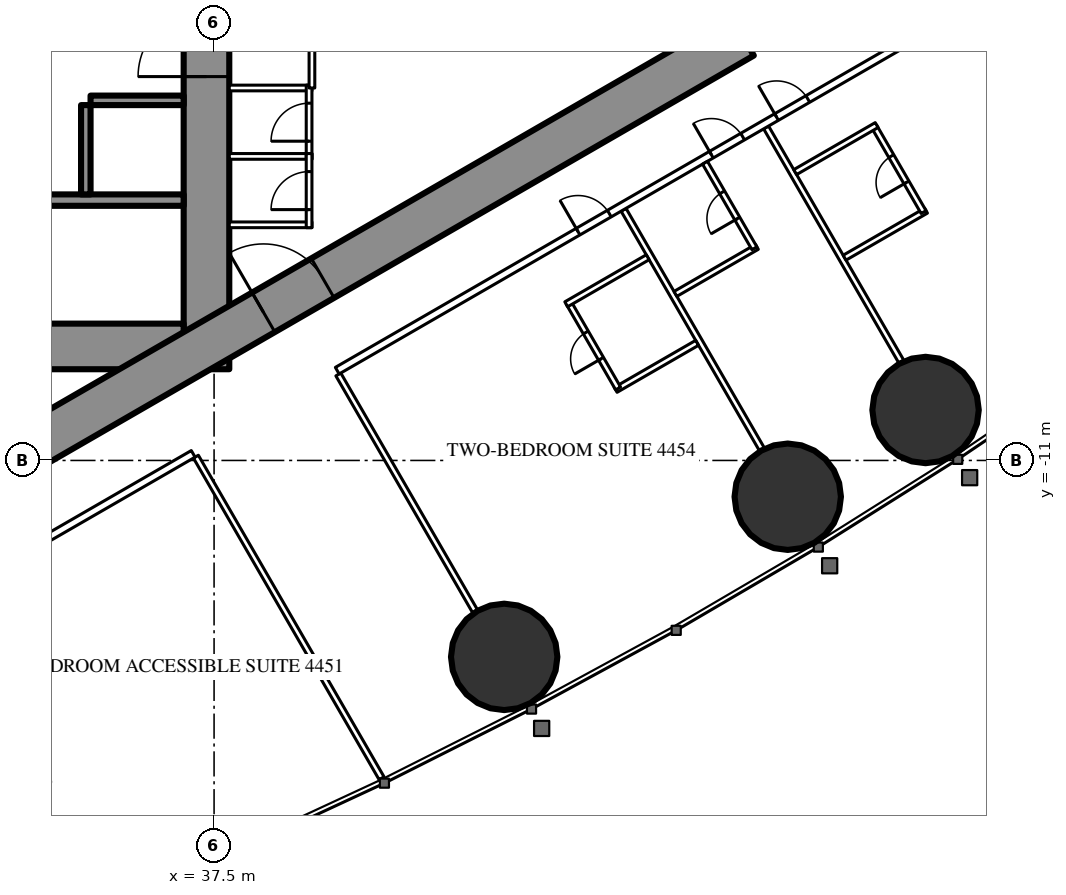
"""IFC4 building model, lengths in metres.
Left out: names, types, materials, properties, quantities, classifications, styles, units other than length and angle.
Written with IfcOpenShell. Run it as: python <this file> out.ifc"""

import sys

from ifc_helpers import new_model, si_unit, direction, frame, frame_2d, origin, origin_2d, place, context, subcontext, project, spatial, rectangle, circle, extrude, element, fill, save


model = new_model("IFC4")
c1 = context("Model", 3, precision=1e-05, world=origin(), true_north=direction((0.0, 1.0)))
c2 = subcontext(c1, "Body", "Model", "MODEL_VIEW")
j1 = project(units=[si_unit("LENGTHUNIT", "METRE"), si_unit("PLANEANGLEUNIT", "RADIAN")], contexts=[c1])
p1 = place(None, origin())
s1 = spatial("IfcSite", under=j1, at=p1, CompositionType="ELEMENT")
p2 = place(p1, origin())
s2 = spatial("IfcBuilding", under=s1, at=p2, CompositionType="ELEMENT")
p3 = place(p2, frame((0.0, 0.0, 166.8)))
s3 = spatial("IfcBuildingStorey", under=s2, at=p3, CompositionType="ELEMENT", Elevation=166.8)
for number, where, z_axis, x_axis in (
    (1, (45.134, -16.168, 0.0), (0.0, 0.0, 1.0), (1.0, 0.0, 0.0)),
    (2, (52.594, -11.955, 0.0), (0.0, 0.0, 1.0), (1.0, 0.0, 0.0)),
    (3, (56.221, -9.672, 0.0), (0.0, 0.0, 1.0), (1.0, 0.0, 0.0)),
):
    element("IfcColumn", number, at=place(p3, frame(where, z_axis=z_axis, x_axis=x_axis)), inside=s3, PredefinedType="COLUMN", context=c2, shape_type="SweptSolid", body=[
        extrude(circle(Radius=1.4, at=origin_2d()), origin(), (0.0, 0.0, 1.0), 3.5),
    ])
p4 = place(p3, frame((37.3, -8.6, 0.0), z_axis=(0.0, 0.0, 1.0), x_axis=(0.0, 1.0, 0.0)))
e4 = element("IfcWall", 4, at=p4, inside=s3, PredefinedType="SHEAR", context=c2, shape_type="SweptSolid", body=[
    extrude(rectangle(XDim=17.2, YDim=1.2, at=frame_2d((8.6, 0.0))), origin(), (0.0, 0.0, 1.0), 3.5),
])
p5 = place(p4, frame((7.7, 0.0, 0.0)))
e5 = element("IfcOpeningElement", 5, at=p5, cuts=e4, PredefinedType="OPENING", context=c2, shape_type="SweptSolid", body=[
    extrude(rectangle(XDim=1.8, YDim=2.2, at=frame_2d((0.9, 1.1))), frame((0.0, 0.61, 0.0), z_axis=(0.0, -1.0, 0.0), x_axis=(1.0, 0.0, 0.0)), (0.0, 0.0, 1.0), 1.22),
])
p6 = place(p3, frame((28.3, -8.0, 0.0), z_axis=(0.0, 0.0, 1.0), x_axis=(1.0, 0.0, 0.0)))
e6 = element("IfcWall", 6, at=p6, inside=s3, PredefinedType="SHEAR", context=c2, shape_type="SweptSolid", body=[
    extrude(rectangle(XDim=8.4, YDim=1.2, at=frame_2d((4.2, 0.0))), origin(), (0.0, 0.0, 1.0), 3.5),
])
p7 = place(p6, frame((0.25, 0.0, 0.0)))
e7 = element("IfcOpeningElement", 7, at=p7, cuts=e6, PredefinedType="OPENING", context=c2, shape_type="SweptSolid", body=[
    extrude(rectangle(XDim=1.0, YDim=2.2, at=frame_2d((0.5, 1.1))), frame((0.0, 0.61, 0.0), z_axis=(0.0, -1.0, 0.0), x_axis=(1.0, 0.0, 0.0)), (0.0, 0.0, 1.0), 1.22),
])
p8 = place(p3, frame((28.3, -4.15, 0.0), z_axis=(0.0, 0.0, 1.0), x_axis=(1.0, 0.0, 0.0)))
e8 = element("IfcWall", 8, at=p8, inside=s3, PredefinedType="SHEAR", context=c2, shape_type="SweptSolid", body=[
    extrude(rectangle(XDim=8.4, YDim=0.3, at=frame_2d((4.2, 0.0))), origin(), (0.0, 0.0, 1.0), 3.5),
])
p9 = place(p3, frame((34.125, -4.0, 0.0), z_axis=(0.0, 0.0, 1.0), x_axis=(0.0, 1.0, 0.0)))
e9 = element("IfcWall", 9, at=p9, inside=s3, PredefinedType="SHEAR", context=c2, shape_type="SweptSolid", body=[
    extrude(rectangle(XDim=2.35, YDim=0.25, at=frame_2d((1.175, 0.0))), origin(), (0.0, 0.0, 1.0), 3.5),
])
p10 = place(p3, frame((34.25, -1.525, 0.0), z_axis=(0.0, 0.0, 1.0), x_axis=(1.0, 0.0, 0.0)))
e10 = element("IfcWall", 10, at=p10, inside=s3, PredefinedType="SHEAR", context=c2, shape_type="SweptSolid", body=[
    extrude(rectangle(XDim=2.45, YDim=0.25, at=frame_2d((1.225, 0.0))), origin(), (0.0, 0.0, 1.0), 3.5),
])
p11 = place(p3, frame((27.2, -13.8, 0.0), z_axis=(0.0, 0.0, 1.0), x_axis=(0.866027159892, 0.499996958321, 0.0)))
e11 = element("IfcWall", 11, at=p11, inside=s3, PredefinedType="SHEAR", context=c2, shape_type="SweptSolid", body=[
    extrude(rectangle(XDim=27.947, YDim=1.2, at=frame_2d((13.973, 0.0))), origin(), (0.0, 0.0, 1.0), 3.5),
])
p12 = place(p11, frame((4.6, 0.0, 0.0)))
e12 = element("IfcOpeningElement", 12, at=p12, cuts=e11, PredefinedType="OPENING", context=c2, shape_type="SweptSolid", body=[
    extrude(rectangle(XDim=1.0, YDim=2.2, at=frame_2d((0.5, 1.1))), frame((0.0, 0.61, 0.0), z_axis=(0.0, -1.0, 0.0), x_axis=(1.0, 0.0, 0.0)), (0.0, 0.0, 1.0), 1.22),
])
p13 = place(p11, frame((13.395, 0.0, 0.0)))
e13 = element("IfcOpeningElement", 13, at=p13, cuts=e11, PredefinedType="OPENING", context=c2, shape_type="SweptSolid", body=[
    extrude(rectangle(XDim=1.8, YDim=2.2, at=frame_2d((0.9, 1.1))), frame((0.0, 0.61, 0.0), z_axis=(0.0, -1.0, 0.0), x_axis=(1.0, 0.0, 0.0)), (0.0, 0.0, 1.0), 1.22),
])
p14 = place(p3, frame((37.022, -10.9, 0.0), z_axis=(0.0, 0.0, 1.0), x_axis=(0.499998620953, -0.866026199976, 0.0)))
e14 = element("IfcWall", 14, at=p14, inside=s3, PredefinedType="PARTITIONING", context=c2, shape_type="SweptSolid", body=[
    extrude(rectangle(XDim=9.77, YDim=0.15, at=frame_2d((4.885, 0.0))), origin(), (0.0, 0.0, 1.0), 3.25),
])
p15 = place(p3, frame((40.769, -8.737, 0.0), z_axis=(0.0, 0.0, 1.0), x_axis=(0.500013115284, -0.866017831539, 0.0)))
e15 = element("IfcWall", 15, at=p15, inside=s3, PredefinedType="PARTITIONING", context=c2, shape_type="SweptSolid", body=[
    extrude(rectangle(XDim=7.198, YDim=0.15, at=frame_2d((3.599, 0.0))), origin(), (0.0, 0.0, 1.0), 2.3),
])
p16 = place(p3, frame((48.275, -4.404, 0.0), z_axis=(0.0, 0.0, 1.0), x_axis=(0.500006004368, -0.866021937133, 0.0)))
e16 = element("IfcWall", 16, at=p16, inside=s3, PredefinedType="PARTITIONING", context=c2, shape_type="SweptSolid", body=[
    extrude(rectangle(XDim=7.279, YDim=0.15, at=frame_2d((3.64, 0.0))), origin(), (0.0, 0.0, 1.0), 2.3),
])
p17 = place(p3, frame((52.025, -2.238, 0.0), z_axis=(0.0, 0.0, 1.0), x_axis=(0.499983785035, -0.866034765296, 0.0)))
e17 = element("IfcWall", 17, at=p17, inside=s3, PredefinedType="PARTITIONING", context=c2, shape_type="SweptSolid", body=[
    extrude(rectangle(XDim=7.116, YDim=0.15, at=frame_2d((3.558, 0.0))), origin(), (0.0, 0.0, 1.0), 2.3),
])
p18 = place(p3, frame((27.959, -16.017, 0.0), z_axis=(0.0, 0.0, 1.0), x_axis=(0.866026201739, 0.499998617899, 0.0)))
e18 = element("IfcWall", 18, at=p18, inside=s3, PredefinedType="PARTITIONING", context=c2, shape_type="SweptSolid", body=[
    extrude(rectangle(XDim=10.382, YDim=0.2, at=frame_2d((5.191, 0.0))), origin(), (0.0, 0.0, 1.0), 3.25),
])
p19 = place(p18, frame((3.35, 0.0, 0.0)))
e19 = element("IfcOpeningElement", 19, at=p19, cuts=e18, PredefinedType="OPENING", context=c2, shape_type="SweptSolid", body=[
    extrude(rectangle(XDim=1.0, YDim=2.2, at=frame_2d((0.5, 1.1))), frame((0.0, 0.11, 0.0), z_axis=(0.0, -1.0, 0.0), x_axis=(1.0, 0.0, 0.0)), (0.0, 0.0, 1.0), 0.22),
])
p20 = place(p3, frame((40.741, -8.638, 0.0), z_axis=(0.0, 0.0, 1.0), x_axis=(0.866022967338, 0.500004220025, 0.0)))
e20 = element("IfcWall", 20, at=p20, inside=s3, PredefinedType="PARTITIONING", context=c2, shape_type="SweptSolid", body=[
    extrude(rectangle(XDim=17.276, YDim=0.2, at=frame_2d((8.638, 0.0))), origin(), (0.0, 0.0, 1.0), 3.25),
])
p21 = place(p20, frame((7.316, 0.0, 0.0)))
e21 = element("IfcOpeningElement", 21, at=p21, cuts=e20, PredefinedType="OPENING", context=c2, shape_type="SweptSolid", body=[
    extrude(rectangle(XDim=0.95, YDim=2.2, at=frame_2d((0.475, 1.1))), frame((0.0, 0.11, 0.0), z_axis=(0.0, -1.0, 0.0), x_axis=(1.0, 0.0, 0.0)), (0.0, 0.0, 1.0), 0.22),
])
p22 = place(p20, frame((11.366, 0.0, 0.0)))
e22 = element("IfcOpeningElement", 22, at=p22, cuts=e20, PredefinedType="OPENING", context=c2, shape_type="SweptSolid", body=[
    extrude(rectangle(XDim=0.95, YDim=2.2, at=frame_2d((0.475, 1.1))), frame((0.0, 0.11, 0.0), z_axis=(0.0, -1.0, 0.0), x_axis=(1.0, 0.0, 0.0)), (0.0, 0.0, 1.0), 0.22),
])
p23 = place(p20, frame((13.347, 0.0, 0.0)))
e23 = element("IfcOpeningElement", 23, at=p23, cuts=e20, PredefinedType="OPENING", context=c2, shape_type="SweptSolid", body=[
    extrude(rectangle(XDim=0.95, YDim=2.2, at=frame_2d((0.475, 1.1))), frame((0.0, 0.11, 0.0), z_axis=(0.0, -1.0, 0.0), x_axis=(1.0, 0.0, 0.0)), (0.0, 0.0, 1.0), 0.22),
])
p24 = place(p3, frame((48.066, -9.143, 0.0), z_axis=(0.0, 0.0, 1.0), x_axis=(0.866006523861, 0.500032699561, 0.0)))
e24 = element("IfcWall", 24, at=p24, inside=s3, PredefinedType="PARTITIONING", context=c2, shape_type="SweptSolid", body=[
    extrude(rectangle(XDim=2.475, YDim=0.15, at=frame_2d((1.237, 0.0))), origin(), (0.0, 0.0, 1.0), 3.25),
])
p25 = place(p3, frame((46.831, -6.854, 0.0), z_axis=(0.0, 0.0, 1.0), x_axis=(0.500006934395, -0.866021400173, 0.0)))
e25 = element("IfcWall", 25, at=p25, inside=s3, PredefinedType="PARTITIONING", context=c2, shape_type="SweptSolid", body=[
    extrude(rectangle(XDim=2.6, YDim=0.15, at=frame_2d((1.3, 0.0))), origin(), (0.0, 0.0, 1.0), 3.25),
])
p26 = place(p25, frame((0.9, 0.0, 0.0)))
e26 = element("IfcOpeningElement", 26, at=p26, cuts=e25, PredefinedType="OPENING", context=c2, shape_type="SweptSolid", body=[
    extrude(rectangle(XDim=0.8, YDim=2.2, at=frame_2d((0.4, 1.1))), frame((0.0, 0.085, 0.0), z_axis=(0.0, -1.0, 0.0), x_axis=(1.0, 0.0, 0.0)), (0.0, 0.0, 1.0), 0.17),
])
for number, where, z_axis, x_axis in (
    (27, (46.766, -6.891, 0.0), (0.0, 0.0, 1.0), (0.866, 0.5, 0.0)),
    (28, (49.64, -6.618, 0.0), (0.0, 0.0, 1.0), (0.866, 0.5, 0.0)),
):
    element("IfcWall", number, at=place(p3, frame(where, z_axis=z_axis, x_axis=x_axis)), inside=s3, PredefinedType="PARTITIONING", context=c2, shape_type="SweptSolid", body=[
        extrude(rectangle(XDim=2.475, YDim=0.15, at=frame_2d((1.237, 0.0))), origin(), (0.0, 0.0, 1.0), 3.25),
    ])
p27 = place(p3, frame((50.418, -3.166, 0.0), z_axis=(0.0, 0.0, 1.0), x_axis=(0.499936506574, -0.866062058628, 0.0)))
e29 = element("IfcWall", 29, at=p27, inside=s3, PredefinedType="PARTITIONING", context=c2, shape_type="SweptSolid", body=[
    extrude(rectangle(XDim=2.6, YDim=0.15, at=frame_2d((1.3, 0.0))), origin(), (0.0, 0.0, 1.0), 3.25),
])
p28 = place(p27, frame((0.9, 0.0, 0.0)))
e30 = element("IfcOpeningElement", 30, at=p28, cuts=e29, PredefinedType="OPENING", context=c2, shape_type="SweptSolid", body=[
    extrude(rectangle(XDim=0.8, YDim=2.2, at=frame_2d((0.4, 1.1))), frame((0.0, 0.085, 0.0), z_axis=(0.0, -1.0, 0.0), x_axis=(1.0, 0.0, 0.0)), (0.0, 0.0, 1.0), 0.17),
])
p29 = place(p3, frame((54.09, -5.665, 0.0), z_axis=(0.0, 0.0, 1.0), x_axis=(0.866006523861, 0.500032699561, 0.0)))
e31 = element("IfcWall", 31, at=p29, inside=s3, PredefinedType="PARTITIONING", context=c2, shape_type="SweptSolid", body=[
    extrude(rectangle(XDim=2.475, YDim=0.15, at=frame_2d((1.237, 0.0))), origin(), (0.0, 0.0, 1.0), 3.25),
])
p30 = place(p3, frame((54.869, -2.213, 0.0), z_axis=(0.0, 0.0, 1.0), x_axis=(0.500047596559, -0.865997922154, 0.0)))
e32 = element("IfcWall", 32, at=p30, inside=s3, PredefinedType="PARTITIONING", context=c2, shape_type="SweptSolid", body=[
    extrude(rectangle(XDim=2.6, YDim=0.15, at=frame_2d((1.3, 0.0))), origin(), (0.0, 0.0, 1.0), 3.25),
])
p31 = place(p30, frame((0.9, 0.0, 0.0)))
e33 = element("IfcOpeningElement", 33, at=p31, cuts=e32, PredefinedType="OPENING", context=c2, shape_type="SweptSolid", body=[
    extrude(rectangle(XDim=0.8, YDim=2.2, at=frame_2d((0.4, 1.1))), frame((0.0, 0.085, 0.0), z_axis=(0.0, -1.0, 0.0), x_axis=(1.0, 0.0, 0.0)), (0.0, 0.0, 1.0), 0.17),
])
p32 = place(p3, frame((52.79, -3.413, 0.0), z_axis=(0.0, 0.0, 1.0), x_axis=(0.866006523861, 0.500032699561, 0.0)))
e34 = element("IfcWall", 34, at=p32, inside=s3, PredefinedType="PARTITIONING", context=c2, shape_type="SweptSolid", body=[
    extrude(rectangle(XDim=2.475, YDim=0.15, at=frame_2d((1.237, 0.0))), origin(), (0.0, 0.0, 1.0), 3.25),
])
for number, where, z_axis, x_axis in (
    (35, (37.9, -1.2, 0.0), (0.0, 0.0, 1.0), (1.0, 0.0, 0.0)),
    (36, (37.9, -3.0, 0.0), (0.0, 0.0, 1.0), (1.0, 0.0, 0.0)),
    (37, (37.9, -4.8, 0.0), (0.0, 0.0, 1.0), (1.0, 0.0, 0.0)),
):
    element("IfcWall", number, at=place(p3, frame(where, z_axis=z_axis, x_axis=x_axis)), inside=s3, PredefinedType="PARTITIONING", context=c2, shape_type="SweptSolid", body=[
        extrude(rectangle(XDim=2.175, YDim=0.15, at=frame_2d((1.087, 0.0))), origin(), (0.0, 0.0, 1.0), 3.25),
    ])
p33 = place(p3, frame((40.0, -3.075, 0.0), z_axis=(0.0, 0.0, 1.0), x_axis=(0.0, 1.0, 0.0)))
e38 = element("IfcWall", 38, at=p33, inside=s3, PredefinedType="PARTITIONING", context=c2, shape_type="SweptSolid", body=[
    extrude(rectangle(XDim=1.95, YDim=0.15, at=frame_2d((0.975, 0.0))), origin(), (0.0, 0.0, 1.0), 3.25),
])
p34 = place(p33, frame((0.475, 0.0, 0.0)))
e39 = element("IfcOpeningElement", 39, at=p34, cuts=e38, PredefinedType="OPENING", context=c2, shape_type="SweptSolid", body=[
    extrude(rectangle(XDim=1.0, YDim=2.2, at=frame_2d((0.5, 1.1))), frame((0.0, 0.085, 0.0), z_axis=(0.0, -1.0, 0.0), x_axis=(1.0, 0.0, 0.0)), (0.0, 0.0, 1.0), 0.17),
])
p35 = place(p3, frame((40.0, -4.875, 0.0), z_axis=(0.0, 0.0, 1.0), x_axis=(0.0, 1.0, 0.0)))
e40 = element("IfcWall", 40, at=p35, inside=s3, PredefinedType="PARTITIONING", context=c2, shape_type="SweptSolid", body=[
    extrude(rectangle(XDim=1.95, YDim=0.15, at=frame_2d((0.975, 0.0))), origin(), (0.0, 0.0, 1.0), 3.25),
])
p36 = place(p35, frame((0.475, 0.0, 0.0)))
e41 = element("IfcOpeningElement", 41, at=p36, cuts=e40, PredefinedType="OPENING", context=c2, shape_type="SweptSolid", body=[
    extrude(rectangle(XDim=1.0, YDim=2.2, at=frame_2d((0.5, 1.1))), frame((0.0, 0.085, 0.0), z_axis=(0.0, -1.0, 0.0), x_axis=(1.0, 0.0, 0.0)), (0.0, 0.0, 1.0), 0.17),
])
p37 = place(p3, frame((40.075, -1.2, 0.0), z_axis=(0.0, 0.0, 1.0), x_axis=(0.0, 1.0, 0.0)))
e42 = element("IfcWall", 42, at=p37, inside=s3, PredefinedType="PARTITIONING", context=c2, shape_type="SweptSolid", body=[
    extrude(rectangle(XDim=6.874, YDim=0.15, at=frame_2d((3.437, 0.0))), origin(), (0.0, 0.0, 1.0), 3.25),
])
p38 = place(p37, frame((2.537, 0.0, 0.0)))
e43 = element("IfcOpeningElement", 43, at=p38, cuts=e42, PredefinedType="OPENING", context=c2, shape_type="SweptSolid", body=[
    extrude(rectangle(XDim=1.8, YDim=2.2, at=frame_2d((0.9, 1.1))), frame((0.0, 0.085, 0.0), z_axis=(0.0, -1.0, 0.0), x_axis=(1.0, 0.0, 0.0)), (0.0, 0.0, 1.0), 0.17),
])
p39 = place(p26, origin())
e44 = element("IfcDoor", 44, at=p39, inside=s3, OperationType="SINGLE_SWING_RIGHT", PredefinedType="DOOR", context=c2, shape_type="SweptSolid", body=[
    extrude(rectangle(XDim=0.8, YDim=2.2, at=frame_2d((0.4, 1.1))), frame((0.0, 0.025, 0.0), z_axis=(0.0, -1.0, 0.0), x_axis=(1.0, 0.0, 0.0)), (0.0, 0.0, 1.0), 0.05),
])
fill(e26, e44)
p40 = place(p21, origin())
e45 = element("IfcDoor", 45, at=p40, inside=s3, OperationType="SINGLE_SWING_LEFT", PredefinedType="DOOR", context=c2, shape_type="SweptSolid", body=[
    extrude(rectangle(XDim=0.95, YDim=2.2, at=frame_2d((0.475, 1.1))), frame((0.0, 0.025, 0.0), z_axis=(0.0, -1.0, 0.0), x_axis=(1.0, 0.0, 0.0)), (0.0, 0.0, 1.0), 0.05),
])
fill(e21, e45)
p41 = place(p28, origin())
e46 = element("IfcDoor", 46, at=p41, inside=s3, OperationType="SINGLE_SWING_RIGHT", PredefinedType="DOOR", context=c2, shape_type="SweptSolid", body=[
    extrude(rectangle(XDim=0.8, YDim=2.2, at=frame_2d((0.4, 1.1))), frame((0.0, 0.025, 0.0), z_axis=(0.0, -1.0, 0.0), x_axis=(1.0, 0.0, 0.0)), (0.0, 0.0, 1.0), 0.05),
])
fill(e30, e46)
p42 = place(p22, origin())
e47 = element("IfcDoor", 47, at=p42, inside=s3, OperationType="SINGLE_SWING_LEFT", PredefinedType="DOOR", context=c2, shape_type="SweptSolid", body=[
    extrude(rectangle(XDim=0.95, YDim=2.2, at=frame_2d((0.475, 1.1))), frame((0.0, 0.025, 0.0), z_axis=(0.0, -1.0, 0.0), x_axis=(1.0, 0.0, 0.0)), (0.0, 0.0, 1.0), 0.05),
])
fill(e22, e47)
p43 = place(p31, origin())
e48 = element("IfcDoor", 48, at=p43, inside=s3, OperationType="SINGLE_SWING_RIGHT", PredefinedType="DOOR", context=c2, shape_type="SweptSolid", body=[
    extrude(rectangle(XDim=0.8, YDim=2.2, at=frame_2d((0.4, 1.1))), frame((0.0, 0.025, 0.0), z_axis=(0.0, -1.0, 0.0), x_axis=(1.0, 0.0, 0.0)), (0.0, 0.0, 1.0), 0.05),
])
fill(e33, e48)
p44 = place(p23, origin())
e49 = element("IfcDoor", 49, at=p44, inside=s3, OperationType="SINGLE_SWING_LEFT", PredefinedType="DOOR", context=c2, shape_type="SweptSolid", body=[
    extrude(rectangle(XDim=0.95, YDim=2.2, at=frame_2d((0.475, 1.1))), frame((0.0, 0.025, 0.0), z_axis=(0.0, -1.0, 0.0), x_axis=(1.0, 0.0, 0.0)), (0.0, 0.0, 1.0), 0.05),
])
fill(e23, e49)
p45 = place(p34, origin())
e50 = element("IfcDoor", 50, at=p45, inside=s3, OperationType="SINGLE_SWING_LEFT", PredefinedType="DOOR", context=c2, shape_type="SweptSolid", body=[
    extrude(rectangle(XDim=1.0, YDim=2.2, at=frame_2d((0.5, 1.1))), frame((0.0, 0.025, 0.0), z_axis=(0.0, -1.0, 0.0), x_axis=(1.0, 0.0, 0.0)), (0.0, 0.0, 1.0), 0.05),
])
fill(e39, e50)
p46 = place(p36, origin())
e51 = element("IfcDoor", 51, at=p46, inside=s3, OperationType="SINGLE_SWING_LEFT", PredefinedType="DOOR", context=c2, shape_type="SweptSolid", body=[
    extrude(rectangle(XDim=1.0, YDim=2.2, at=frame_2d((0.5, 1.1))), frame((0.0, 0.025, 0.0), z_axis=(0.0, -1.0, 0.0), x_axis=(1.0, 0.0, 0.0)), (0.0, 0.0, 1.0), 0.05),
])
fill(e41, e51)
p47 = place(p13, origin())
e52 = element("IfcDoor", 52, at=p47, inside=s3, OperationType="DOUBLE_DOOR_SINGLE_SWING", PredefinedType="DOOR", context=c2, shape_type="SweptSolid", body=[
    extrude(rectangle(XDim=1.8, YDim=2.2, at=frame_2d((0.9, 1.1))), frame((0.0, 0.025, 0.0), z_axis=(0.0, -1.0, 0.0), x_axis=(1.0, 0.0, 0.0)), (0.0, 0.0, 1.0), 0.05),
])
fill(e13, e52)
p48 = place(p5, origin())
e53 = element("IfcDoor", 53, at=p48, inside=s3, OperationType="DOUBLE_DOOR_SINGLE_SWING", PredefinedType="DOOR", context=c2, shape_type="SweptSolid", body=[
    extrude(rectangle(XDim=1.8, YDim=2.2, at=frame_2d((0.9, 1.1))), frame((0.0, 0.025, 0.0), z_axis=(0.0, -1.0, 0.0), x_axis=(1.0, 0.0, 0.0)), (0.0, 0.0, 1.0), 0.05),
])
fill(e5, e53)
save(model, sys.argv[1])
